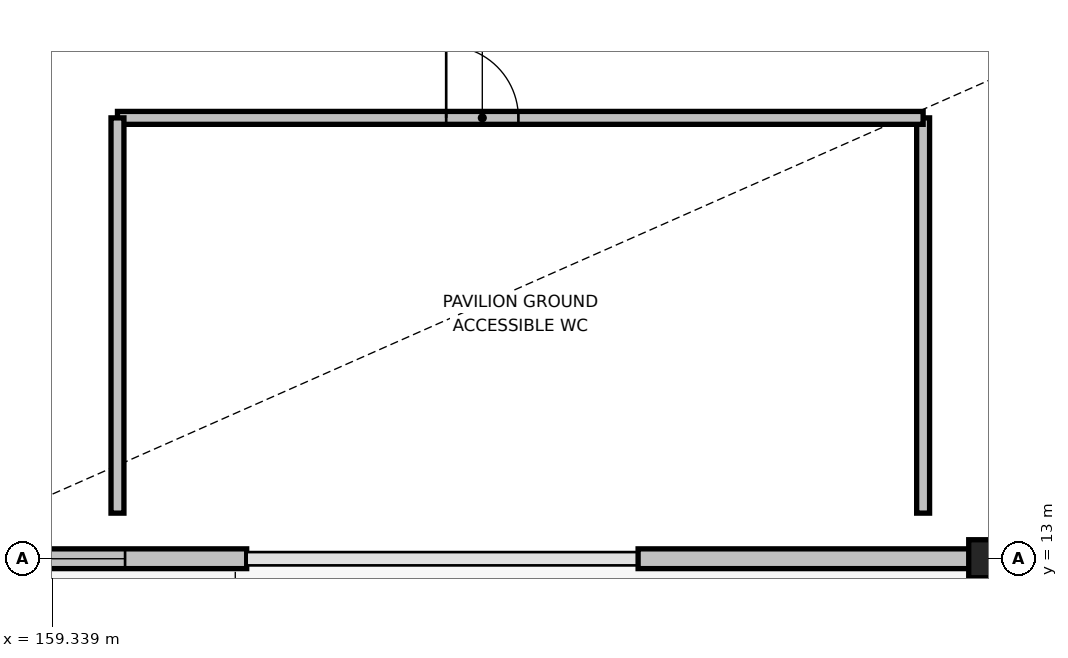
"""IFC4 building model, lengths in metres.
Left out: names, types, materials, properties, quantities, classifications, styles, units other than length and angle.
Written with IfcOpenShell. Run it as: python <this file> out.ifc"""

import sys

from ifc_helpers import new_model, si_unit, direction, frame, frame_2d, origin, origin_2d, place, context, subcontext, project, spatial, rectangle, i_section, extrude, element, fill, save


model = new_model("IFC4")
c1 = context("Model", 3, precision=1e-05, world=origin(), true_north=direction((0.0, 1.0)))
c2 = subcontext(c1, "Body", "Model", "MODEL_VIEW")
j1 = project(units=[si_unit("LENGTHUNIT", "METRE"), si_unit("PLANEANGLEUNIT", "RADIAN")], contexts=[c1])
p1 = place(None, origin())
s1 = spatial("IfcSite", under=j1, at=p1, CompositionType="ELEMENT")
p2 = place(p1, origin())
s2 = spatial("IfcBuilding", under=s1, at=p2, CompositionType="ELEMENT")
p3 = place(p2, origin())
s3 = spatial("IfcBuildingStorey", under=s2, at=p3, CompositionType="ELEMENT", Elevation=0.0)
p4 = place(p3, frame((171.55, 13.0, 0.0), z_axis=(0.0, 0.0, 1.0), x_axis=(1.0, 0.0, 0.0)))
e1 = element("IfcColumn", 1, at=p4, inside=s3, PredefinedType="COLUMN", context=c2, shape_type="SweptSolid", body=[
    extrude(i_section(OverallWidth=0.3, OverallDepth=0.5, WebThickness=0.014, FlangeThickness=0.028, FilletRadius=0.027, at=origin_2d()), origin(), (0.0, 0.0, 1.0), 5.4),
])
p5 = place(p3, frame((157.4, 13.0, 0.0), z_axis=(0.0, 0.0, 1.0), x_axis=(1.0, 0.0, 0.0)))
e2 = element("IfcWall", 2, at=p5, inside=s3, PredefinedType="STANDARD", context=c2, shape_type="SweptSolid", body=[
    extrude(rectangle(XDim=4.5, YDim=0.26, at=frame_2d((2.25, 0.0))), origin(), (0.0, 0.0, 1.0), 4.625),
])
p6 = place(p5, frame((1.3, 0.0, 0.7)))
e3 = element("IfcOpeningElement", 3, at=p6, cuts=e2, PredefinedType="OPENING", context=c2, shape_type="SweptSolid", body=[
    extrude(rectangle(XDim=1.6, YDim=1.5, at=frame_2d((0.8, 0.75))), frame((0.0, 0.14, 0.0), z_axis=(0.0, -1.0, 0.0), x_axis=(1.0, 0.0, 0.0)), (0.0, 0.0, 1.0), 0.28),
])
p7 = place(p3, frame((167.05, 13.0, 0.0), z_axis=(0.0, 0.0, 1.0), x_axis=(1.0, 0.0, 0.0)))
e4 = element("IfcWall", 4, at=p7, inside=s3, PredefinedType="STANDARD", context=c2, shape_type="SweptSolid", body=[
    extrude(rectangle(XDim=4.5, YDim=0.26, at=frame_2d((2.25, 0.0))), origin(), (0.0, 0.0, 1.0), 4.625),
])
p8 = place(p3, frame((171.55, 13.0, 0.0), z_axis=(0.0, 0.0, 1.0), x_axis=(1.0, 0.0, 0.0)))
e5 = element("IfcWall", 5, at=p8, inside=s3, PredefinedType="STANDARD", context=c2, shape_type="SweptSolid", body=[
    extrude(rectangle(XDim=14.15, YDim=0.26, at=frame_2d((7.075, 0.0))), origin(), (0.0, 0.0, 1.0), 4.625),
])
p9 = place(p8, frame((9.25, 0.0, 0.0), z_axis=(0.0, 0.0, 1.0), x_axis=(-1.0, 0.0, 0.0)))
e6 = element("IfcOpeningElement", 6, at=p9, cuts=e5, PredefinedType="OPENING", context=c2, shape_type="SweptSolid", body=[
    extrude(rectangle(XDim=2.4, YDim=2.4, at=frame_2d((1.2, 1.2))), frame((0.0, 0.14, 0.0), z_axis=(0.0, -1.0, 0.0), x_axis=(1.0, 0.0, 0.0)), (0.0, 0.0, 1.0), 0.28),
])
p10 = place(p3, frame((170.8, 13.6, 0.0), z_axis=(0.0, 0.0, 1.0), x_axis=(0.0, 1.0, 0.0)))
e7 = element("IfcWall", 7, at=p10, inside=s3, PredefinedType="PLUMBINGWALL", context=c2, shape_type="SweptSolid", body=[
    extrude(rectangle(XDim=5.2, YDim=0.17, at=frame_2d((2.6, 0.0))), origin(), (0.0, 0.0, 1.0), 4.675),
])
p11 = place(p3, frame((170.8, 18.8, 0.0), z_axis=(0.0, 0.0, 1.0), x_axis=(-1.0, 0.0, 0.0)))
e8 = element("IfcWall", 8, at=p11, inside=s3, PredefinedType="PLUMBINGWALL", context=c2, shape_type="SweptSolid", body=[
    extrude(rectangle(XDim=10.6, YDim=0.17, at=frame_2d((5.3, 0.0))), origin(), (0.0, 0.0, 1.0), 5.16),
])
p12 = place(p11, frame((5.325, 0.0, 0.0)))
e9 = element("IfcOpeningElement", 9, at=p12, cuts=e8, PredefinedType="OPENING", context=c2, shape_type="SweptSolid", body=[
    extrude(rectangle(XDim=0.95, YDim=2.15, at=frame_2d((0.475, 1.075))), frame((0.0, 0.095, 0.0), z_axis=(0.0, -1.0, 0.0), x_axis=(1.0, 0.0, 0.0)), (0.0, 0.0, 1.0), 0.19),
])
p13 = place(p3, frame((160.2, 18.8, 0.0), z_axis=(0.0, 0.0, 1.0), x_axis=(0.0, -1.0, 0.0)))
e10 = element("IfcWall", 10, at=p13, inside=s3, PredefinedType="PLUMBINGWALL", context=c2, shape_type="SweptSolid", body=[
    extrude(rectangle(XDim=5.2, YDim=0.17, at=frame_2d((2.6, 0.0))), origin(), (0.0, 0.0, 1.0), 5.16),
])
p14 = place(p6, origin())
e11 = element("IfcWindow", 11, at=p14, inside=s3, PartitioningType="SINGLE_PANEL", PredefinedType="WINDOW", context=c2, shape_type="SweptSolid", body=[
    extrude(rectangle(XDim=1.6, YDim=1.5, at=frame_2d((0.8, 0.75))), frame((0.0, 0.03, 0.0), z_axis=(0.0, -1.0, 0.0), x_axis=(1.0, 0.0, 0.0)), (0.0, 0.0, 1.0), 0.06),
])
fill(e3, e11)
p15 = place(p12, origin())
e12 = element("IfcDoor", 12, at=p15, inside=s3, OperationType="SINGLE_SWING_RIGHT", PredefinedType="DOOR", context=c2, shape_type="SweptSolid", body=[
    extrude(rectangle(XDim=0.95, YDim=2.15, at=frame_2d((0.475, 1.075))), frame((0.0, 0.025, 0.0), z_axis=(0.0, -1.0, 0.0), x_axis=(1.0, 0.0, 0.0)), (0.0, 0.0, 1.0), 0.05),
])
fill(e9, e12)
save(model, sys.argv[1])
